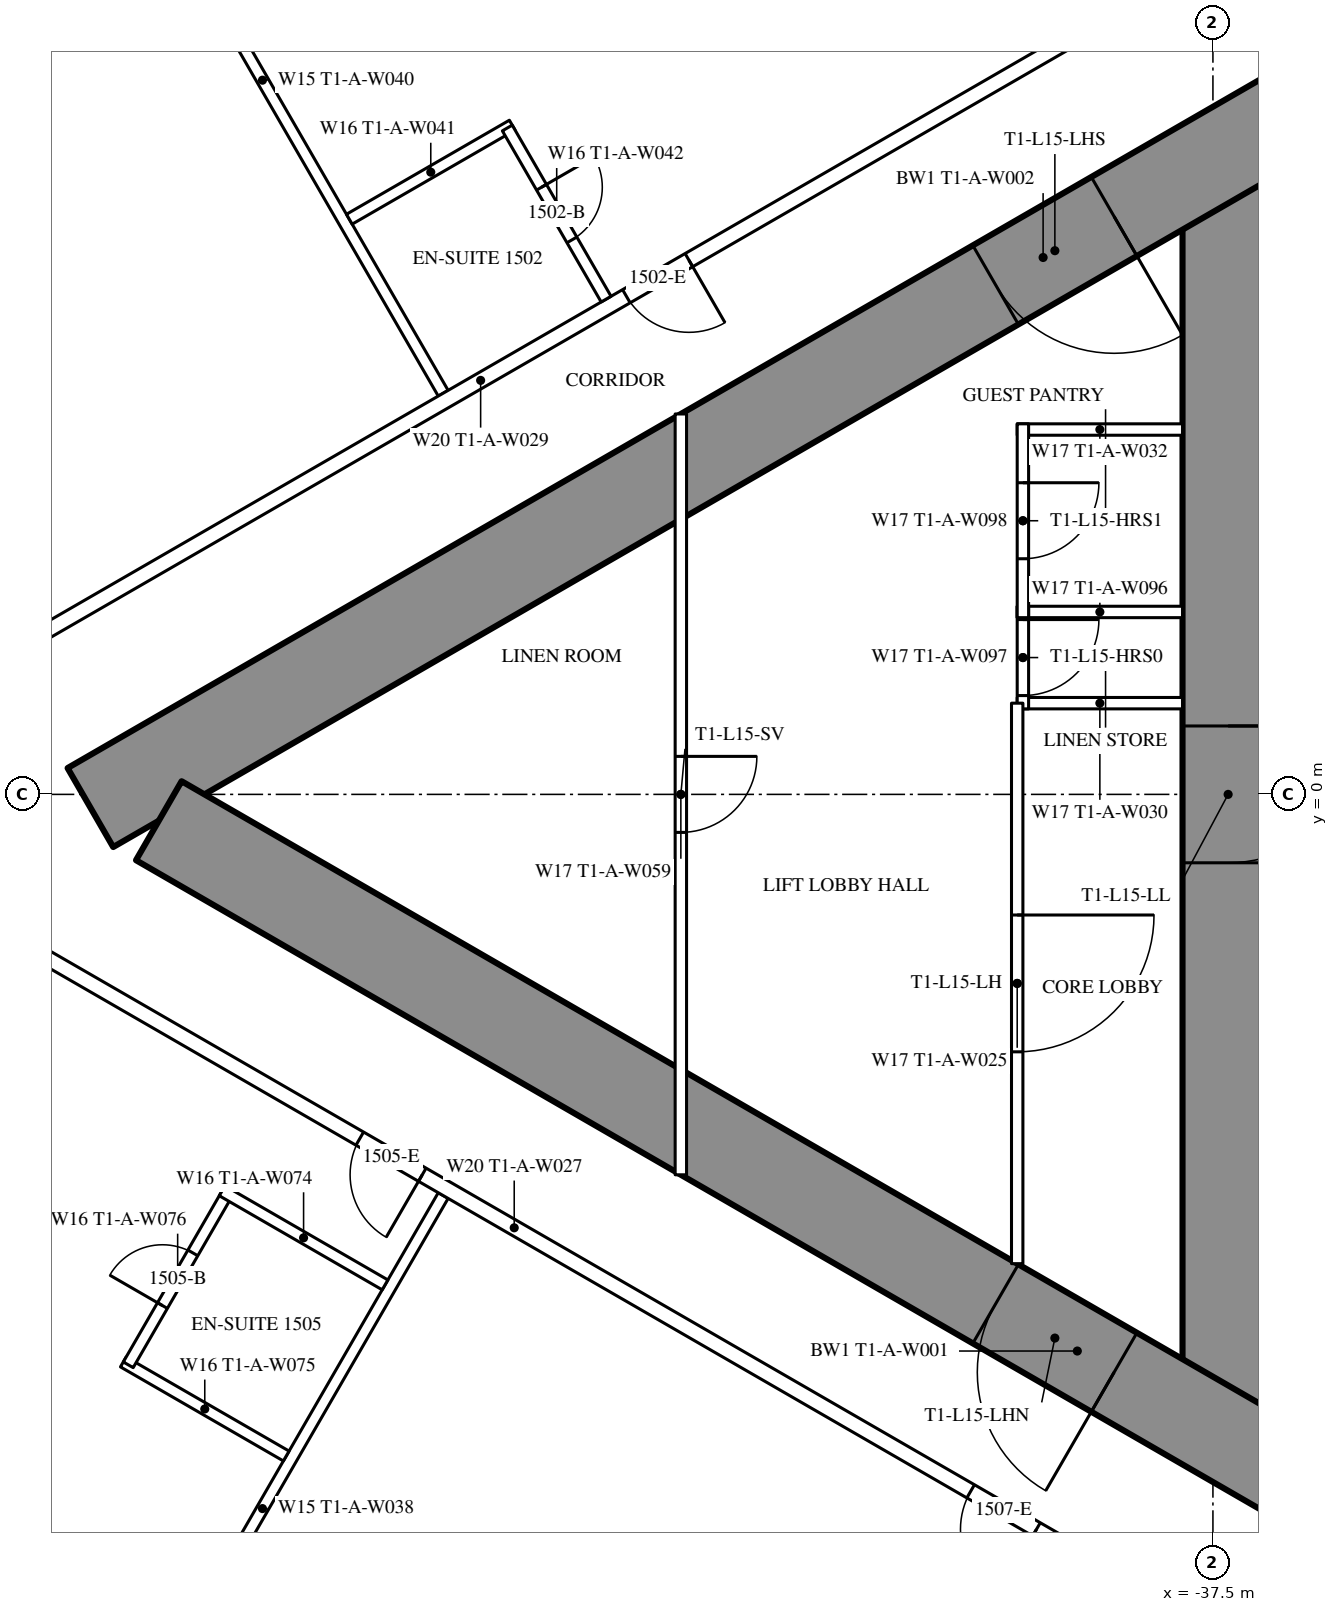
"""IFC4 building model, lengths in metres.
Left out: names, types, materials, properties, quantities, classifications, styles, units other than length and angle.
Written with IfcOpenShell. Run it as: python <this file> out.ifc"""

import sys

from ifc_helpers import new_model, si_unit, direction, frame, frame_2d, origin, place, context, subcontext, project, spatial, rectangle, extrude, element, fill, save


model = new_model("IFC4")
c1 = context("Model", 3, precision=1e-05, world=origin(), true_north=direction((0.0, 1.0)))
c2 = subcontext(c1, "Body", "Model", "MODEL_VIEW")
j1 = project(units=[si_unit("LENGTHUNIT", "METRE"), si_unit("PLANEANGLEUNIT", "RADIAN")], contexts=[c1])
p1 = place(None, origin())
s1 = spatial("IfcSite", under=j1, at=p1, CompositionType="ELEMENT")
p2 = place(p1, origin())
s2 = spatial("IfcBuilding", under=s1, at=p2, CompositionType="ELEMENT")
p3 = place(p2, frame((0.0, 0.0, 60.0)))
s3 = spatial("IfcBuildingStorey", under=s2, at=p3, CompositionType="ELEMENT", Elevation=60.0)
p4 = place(p3, frame((-37.3, 8.6, 0.0), z_axis=(0.0, 0.0, 1.0), x_axis=(0.0, -1.0, 0.0)))
e1 = element("IfcWall", 1, at=p4, inside=s3, PredefinedType="SHEAR", context=c2, shape_type="SweptSolid", body=[
    extrude(rectangle(XDim=17.2, YDim=1.2, at=frame_2d((8.6, 0.0))), origin(), (0.0, 0.0, 1.0), 3.5),
])
p5 = place(p4, frame((7.7, 0.0, 0.0)))
e2 = element("IfcOpeningElement", 2, at=p5, cuts=e1, PredefinedType="OPENING", context=c2, shape_type="SweptSolid", body=[
    extrude(rectangle(XDim=1.8, YDim=2.2, at=frame_2d((0.9, 1.1))), frame((0.0, 0.61, 0.0), z_axis=(0.0, -1.0, 0.0), x_axis=(1.0, 0.0, 0.0)), (0.0, 0.0, 1.0), 1.22),
])
p6 = place(p3, frame((-27.2, 14.3, 0.0), z_axis=(0.0, 0.0, 1.0), x_axis=(-0.866026593062, -0.499997940104, 0.0)))
e3 = element("IfcWall", 3, at=p6, inside=s3, PredefinedType="SHEAR", context=c2, shape_type="SweptSolid", body=[
    extrude(rectangle(XDim=28.946, YDim=1.2, at=frame_2d((14.473, 0.0))), origin(), (0.0, 0.0, 1.0), 3.5),
])
p7 = place(p6, frame((4.6, 0.0, 0.0)))
e4 = element("IfcOpeningElement", 4, at=p7, cuts=e3, PredefinedType="OPENING", context=c2, shape_type="SweptSolid", body=[
    extrude(rectangle(XDim=1.0, YDim=2.2, at=frame_2d((0.5, 1.1))), frame((0.0, 0.61, 0.0), z_axis=(0.0, -1.0, 0.0), x_axis=(1.0, 0.0, 0.0)), (0.0, 0.0, 1.0), 1.22),
])
p8 = place(p6, frame((13.395, 0.0, 0.0)))
e5 = element("IfcOpeningElement", 5, at=p8, cuts=e3, PredefinedType="OPENING", context=c2, shape_type="SweptSolid", body=[
    extrude(rectangle(XDim=1.8, YDim=2.2, at=frame_2d((0.9, 1.1))), frame((0.0, 0.61, 0.0), z_axis=(0.0, -1.0, 0.0), x_axis=(1.0, 0.0, 0.0)), (0.0, 0.0, 1.0), 1.22),
])
p9 = place(p3, frame((-27.2, -14.3, 0.0), z_axis=(0.0, 0.0, 1.0), x_axis=(-0.866024021859, 0.500002393557, 0.0)))
e6 = element("IfcWall", 6, at=p9, inside=s3, PredefinedType="SHEAR", context=c2, shape_type="SweptSolid", body=[
    extrude(rectangle(XDim=27.907, YDim=1.2, at=frame_2d((13.954, 0.0))), origin(), (0.0, 0.0, 1.0), 3.5),
])
p10 = place(p9, frame((4.6, 0.0, 0.0)))
e7 = element("IfcOpeningElement", 7, at=p10, cuts=e6, PredefinedType="OPENING", context=c2, shape_type="SweptSolid", body=[
    extrude(rectangle(XDim=1.0, YDim=2.2, at=frame_2d((0.5, 1.1))), frame((0.0, 0.61, 0.0), z_axis=(0.0, -1.0, 0.0), x_axis=(1.0, 0.0, 0.0)), (0.0, 0.0, 1.0), 1.22),
])
p11 = place(p9, frame((13.395, 0.0, 0.0)))
e8 = element("IfcOpeningElement", 8, at=p11, cuts=e6, PredefinedType="OPENING", context=c2, shape_type="SweptSolid", body=[
    extrude(rectangle(XDim=1.8, YDim=2.2, at=frame_2d((0.9, 1.1))), frame((0.0, 0.61, 0.0), z_axis=(0.0, -1.0, 0.0), x_axis=(1.0, 0.0, 0.0)), (0.0, 0.0, 1.0), 1.22),
])
for number, where, z_axis, x_axis in (
    (9, (-47.627, 5.278, 0.0), (0.0, 0.0, 1.0), (-0.5, 0.866, 0.0)),
    (10, (-47.627, -5.278, 0.0), (0.0, 0.0, 1.0), (-0.5, -0.866, 0.0)),
):
    element("IfcWall", number, at=place(p3, frame(where, z_axis=z_axis, x_axis=x_axis)), inside=s3, PredefinedType="PARTITIONING", context=c2, shape_type="SweptSolid", body=[
        extrude(rectangle(XDim=9.51, YDim=0.15, at=frame_2d((4.755, 0.0))), origin(), (0.0, 0.0, 1.0), 2.25),
    ])
p12 = place(p3, frame((-37.7, 10.894, 0.0), z_axis=(0.0, 0.0, 1.0), x_axis=(-0.866027905338, -0.499995667157, 0.0)))
e11 = element("IfcWall", 11, at=p12, inside=s3, PredefinedType="PARTITIONING", context=c2, shape_type="SweptSolid", body=[
    extrude(rectangle(XDim=21.787, YDim=0.2, at=frame_2d((10.894, 0.0))), origin(), (0.0, 0.0, 1.0), 3.25),
])
p13 = place(p12, frame((20.237, 0.0, 0.0)))
e12 = element("IfcOpeningElement", 12, at=p13, cuts=e11, PredefinedType="OPENING", context=c2, shape_type="SweptSolid", body=[
    extrude(rectangle(XDim=0.95, YDim=2.2, at=frame_2d((0.475, 1.1))), frame((0.0, 0.11, 0.0), z_axis=(0.0, -1.0, 0.0), x_axis=(1.0, 0.0, 0.0)), (0.0, 0.0, 1.0), 0.22),
])
p14 = place(p12, frame((7.73, 0.0, 0.0)))
e13 = element("IfcOpeningElement", 13, at=p14, cuts=e11, PredefinedType="OPENING", context=c2, shape_type="SweptSolid", body=[
    extrude(rectangle(XDim=0.95, YDim=2.2, at=frame_2d((0.475, 1.1))), frame((0.0, 0.11, 0.0), z_axis=(0.0, -1.0, 0.0), x_axis=(1.0, 0.0, 0.0)), (0.0, 0.0, 1.0), 0.22),
])
p15 = place(p3, frame((-36.92, -11.344, 0.0), z_axis=(0.0, 0.0, 1.0), x_axis=(-0.866028313256, 0.499994960614, 0.0)))
e14 = element("IfcWall", 14, at=p15, inside=s3, PredefinedType="PARTITIONING", context=c2, shape_type="SweptSolid", body=[
    extrude(rectangle(XDim=22.568, YDim=0.2, at=frame_2d((11.284, 0.0))), origin(), (0.0, 0.0, 1.0), 3.25),
])
p16 = place(p15, frame((12.68, 0.0, 0.0)))
e15 = element("IfcOpeningElement", 15, at=p16, cuts=e14, PredefinedType="OPENING", context=c2, shape_type="SweptSolid", body=[
    extrude(rectangle(XDim=0.95, YDim=2.2, at=frame_2d((0.475, 1.1))), frame((0.0, 0.11, 0.0), z_axis=(0.0, -1.0, 0.0), x_axis=(1.0, 0.0, 0.0)), (0.0, 0.0, 1.0), 0.22),
])
p17 = place(p15, frame((3.35, 0.0, 0.0)))
e16 = element("IfcOpeningElement", 16, at=p17, cuts=e14, PredefinedType="OPENING", context=c2, shape_type="SweptSolid", body=[
    extrude(rectangle(XDim=1.0, YDim=2.2, at=frame_2d((0.5, 1.1))), frame((0.0, 0.11, 0.0), z_axis=(0.0, -1.0, 0.0), x_axis=(1.0, 0.0, 0.0)), (0.0, 0.0, 1.0), 0.22),
])
p18 = place(p3, frame((-49.692, -8.704, 0.0), z_axis=(0.0, 0.0, 1.0), x_axis=(-0.866073894602, 0.499916002032, 0.0)))
e17 = element("IfcWall", 17, at=p18, inside=s3, PredefinedType="PARTITIONING", context=c2, shape_type="SweptSolid", body=[
    extrude(rectangle(XDim=2.475, YDim=0.15, at=frame_2d((1.238, 0.0))), origin(), (0.0, 0.0, 1.0), 3.25),
])
p19 = place(p3, frame((-50.47, -5.253, 0.0), z_axis=(0.0, 0.0, 1.0), x_axis=(-0.500006934395, -0.866021400173, 0.0)))
e18 = element("IfcWall", 18, at=p19, inside=s3, PredefinedType="PARTITIONING", context=c2, shape_type="SweptSolid", body=[
    extrude(rectangle(XDim=2.6, YDim=0.15, at=frame_2d((1.3, 0.0))), origin(), (0.0, 0.0, 1.0), 3.25),
])
p20 = place(p19, frame((0.9, 0.0, 0.0)))
e19 = element("IfcOpeningElement", 19, at=p20, cuts=e18, PredefinedType="OPENING", context=c2, shape_type="SweptSolid", body=[
    extrude(rectangle(XDim=0.8, YDim=2.2, at=frame_2d((0.4, 1.1))), frame((0.0, 0.085, 0.0), z_axis=(0.0, -1.0, 0.0), x_axis=(1.0, 0.0, 0.0)), (0.0, 0.0, 1.0), 0.17),
])
for number, where, z_axis, x_axis in (
    (20, (-48.392, -6.453, 0.0), (0.0, 0.0, 1.0), (-0.866, 0.5, 0.0)),
    (21, (-46.719, 8.804, 0.0), (0.0, 0.0, 1.0), (-0.866, -0.5, 0.0)),
):
    element("IfcWall", number, at=place(p3, frame(where, z_axis=z_axis, x_axis=x_axis)), inside=s3, PredefinedType="PARTITIONING", context=c2, shape_type="SweptSolid", body=[
        extrude(rectangle(XDim=2.475, YDim=0.15, at=frame_2d((1.237, 0.0))), origin(), (0.0, 0.0, 1.0), 3.25),
    ])
p21 = place(p3, frame((-45.483, 6.515, 0.0), z_axis=(0.0, 0.0, 1.0), x_axis=(-0.500006934395, 0.866021400173, 0.0)))
e22 = element("IfcWall", 22, at=p21, inside=s3, PredefinedType="PARTITIONING", context=c2, shape_type="SweptSolid", body=[
    extrude(rectangle(XDim=2.6, YDim=0.15, at=frame_2d((1.3, 0.0))), origin(), (0.0, 0.0, 1.0), 3.25),
])
p22 = place(p21, frame((0.9, 0.0, 0.0)))
e23 = element("IfcOpeningElement", 23, at=p22, cuts=e22, PredefinedType="OPENING", context=c2, shape_type="SweptSolid", body=[
    extrude(rectangle(XDim=0.8, YDim=2.2, at=frame_2d((0.4, 1.1))), frame((0.0, 0.085, 0.0), z_axis=(0.0, -1.0, 0.0), x_axis=(1.0, 0.0, 0.0)), (0.0, 0.0, 1.0), 0.17),
])
for number, where, z_axis, x_axis in (
    (24, (-37.9, 1.2, 0.0), (0.0, 0.0, 1.0), (-1.0, 0.0, 0.0)),
    (25, (-37.9, 2.4, 0.0), (0.0, 0.0, 1.0), (-1.0, 0.0, 0.0)),
    (26, (-37.9, 4.8, 0.0), (0.0, 0.0, 1.0), (-1.0, 0.0, 0.0)),
):
    element("IfcWall", number, at=place(p3, frame(where, z_axis=z_axis, x_axis=x_axis)), inside=s3, PredefinedType="PARTITIONING", context=c2, shape_type="SweptSolid", body=[
        extrude(rectangle(XDim=2.175, YDim=0.15, at=frame_2d((1.087, 0.0))), origin(), (0.0, 0.0, 1.0), 3.25),
    ])
p23 = place(p3, frame((-40.0, 2.475, 0.0), z_axis=(0.0, 0.0, 1.0), x_axis=(0.0, -1.0, 0.0)))
e27 = element("IfcWall", 27, at=p23, inside=s3, PredefinedType="PARTITIONING", context=c2, shape_type="SweptSolid", body=[
    extrude(rectangle(XDim=1.35, YDim=0.15, at=frame_2d((0.675, 0.0))), origin(), (0.0, 0.0, 1.0), 3.25),
])
p24 = place(p23, frame((0.175, 0.0, 0.0)))
e28 = element("IfcOpeningElement", 28, at=p24, cuts=e27, PredefinedType="OPENING", context=c2, shape_type="SweptSolid", body=[
    extrude(rectangle(XDim=1.0, YDim=2.2, at=frame_2d((0.5, 1.1))), frame((0.0, 0.085, 0.0), z_axis=(0.0, -1.0, 0.0), x_axis=(1.0, 0.0, 0.0)), (0.0, 0.0, 1.0), 0.17),
])
p25 = place(p3, frame((-40.0, 4.875, 0.0), z_axis=(0.0, 0.0, 1.0), x_axis=(0.0, -1.0, 0.0)))
e29 = element("IfcWall", 29, at=p25, inside=s3, PredefinedType="PARTITIONING", context=c2, shape_type="SweptSolid", body=[
    extrude(rectangle(XDim=2.55, YDim=0.15, at=frame_2d((1.275, 0.0))), origin(), (0.0, 0.0, 1.0), 3.25),
])
p26 = place(p25, frame((0.775, 0.0, 0.0)))
e30 = element("IfcOpeningElement", 30, at=p26, cuts=e29, PredefinedType="OPENING", context=c2, shape_type="SweptSolid", body=[
    extrude(rectangle(XDim=1.0, YDim=2.2, at=frame_2d((0.5, 1.1))), frame((0.0, 0.085, 0.0), z_axis=(0.0, -1.0, 0.0), x_axis=(1.0, 0.0, 0.0)), (0.0, 0.0, 1.0), 0.17),
])
p27 = place(p3, frame((-40.075, 1.2, 0.0), z_axis=(0.0, 0.0, 1.0), x_axis=(0.0, -1.0, 0.0)))
e31 = element("IfcWall", 31, at=p27, inside=s3, PredefinedType="PARTITIONING", context=c2, shape_type="SweptSolid", body=[
    extrude(rectangle(XDim=7.374, YDim=0.15, at=frame_2d((3.687, 0.0))), origin(), (0.0, 0.0, 1.0), 3.25),
])
p28 = place(p27, frame((2.787, 0.0, 0.0)))
e32 = element("IfcOpeningElement", 32, at=p28, cuts=e31, PredefinedType="OPENING", context=c2, shape_type="SweptSolid", body=[
    extrude(rectangle(XDim=1.8, YDim=2.2, at=frame_2d((0.9, 1.1))), frame((0.0, 0.085, 0.0), z_axis=(0.0, -1.0, 0.0), x_axis=(1.0, 0.0, 0.0)), (0.0, 0.0, 1.0), 0.17),
])
p29 = place(p3, frame((-44.5, 5.005, 0.0), z_axis=(0.0, 0.0, 1.0), x_axis=(0.0, -1.0, 0.0)))
e33 = element("IfcWall", 33, at=p29, inside=s3, PredefinedType="PARTITIONING", context=c2, shape_type="SweptSolid", body=[
    extrude(rectangle(XDim=10.009, YDim=0.15, at=frame_2d((5.005, 0.0))), origin(), (0.0, 0.0, 1.0), 2.45),
])
p30 = place(p29, frame((4.505, 0.0, 0.0)))
e34 = element("IfcOpeningElement", 34, at=p30, cuts=e33, PredefinedType="OPENING", context=c2, shape_type="SweptSolid", body=[
    extrude(rectangle(XDim=1.0, YDim=2.2, at=frame_2d((0.5, 1.1))), frame((0.0, 0.085, 0.0), z_axis=(0.0, -1.0, 0.0), x_axis=(1.0, 0.0, 0.0)), (0.0, 0.0, 1.0), 0.17),
])
p31 = place(p20, origin())
e35 = element("IfcDoor", 35, at=p31, inside=s3, OperationType="SINGLE_SWING_RIGHT", PredefinedType="DOOR", context=c2, shape_type="SweptSolid", body=[
    extrude(rectangle(XDim=0.8, YDim=2.2, at=frame_2d((0.4, 1.1))), frame((0.0, 0.025, 0.0), z_axis=(0.0, -1.0, 0.0), x_axis=(1.0, 0.0, 0.0)), (0.0, 0.0, 1.0), 0.05),
])
fill(e19, e35)
p32 = place(p16, origin())
e36 = element("IfcDoor", 36, at=p32, inside=s3, OperationType="SINGLE_SWING_LEFT", PredefinedType="DOOR", context=c2, shape_type="SweptSolid", body=[
    extrude(rectangle(XDim=0.95, YDim=2.2, at=frame_2d((0.475, 1.1))), frame((0.0, 0.025, 0.0), z_axis=(0.0, -1.0, 0.0), x_axis=(1.0, 0.0, 0.0)), (0.0, 0.0, 1.0), 0.05),
])
fill(e15, e36)
p33 = place(p17, origin())
e37 = element("IfcDoor", 37, at=p33, inside=s3, OperationType="SINGLE_SWING_LEFT", PredefinedType="DOOR", context=c2, shape_type="SweptSolid", body=[
    extrude(rectangle(XDim=1.0, YDim=2.2, at=frame_2d((0.5, 1.1))), frame((0.0, 0.025, 0.0), z_axis=(0.0, -1.0, 0.0), x_axis=(1.0, 0.0, 0.0)), (0.0, 0.0, 1.0), 0.05),
])
fill(e16, e37)
p34 = place(p22, origin())
e38 = element("IfcDoor", 38, at=p34, inside=s3, OperationType="SINGLE_SWING_RIGHT", PredefinedType="DOOR", context=c2, shape_type="SweptSolid", body=[
    extrude(rectangle(XDim=0.8, YDim=2.2, at=frame_2d((0.4, 1.1))), frame((0.0, 0.025, 0.0), z_axis=(0.0, -1.0, 0.0), x_axis=(1.0, 0.0, 0.0)), (0.0, 0.0, 1.0), 0.05),
])
fill(e23, e38)
p35 = place(p14, origin())
e39 = element("IfcDoor", 39, at=p35, inside=s3, OperationType="SINGLE_SWING_LEFT", PredefinedType="DOOR", context=c2, shape_type="SweptSolid", body=[
    extrude(rectangle(XDim=0.95, YDim=2.2, at=frame_2d((0.475, 1.1))), frame((0.0, 0.025, 0.0), z_axis=(0.0, -1.0, 0.0), x_axis=(1.0, 0.0, 0.0)), (0.0, 0.0, 1.0), 0.05),
])
fill(e13, e39)
p36 = place(p24, origin())
e40 = element("IfcDoor", 40, at=p36, inside=s3, OperationType="SINGLE_SWING_LEFT", PredefinedType="DOOR", context=c2, shape_type="SweptSolid", body=[
    extrude(rectangle(XDim=1.0, YDim=2.2, at=frame_2d((0.5, 1.1))), frame((0.0, 0.025, 0.0), z_axis=(0.0, -1.0, 0.0), x_axis=(1.0, 0.0, 0.0)), (0.0, 0.0, 1.0), 0.05),
])
fill(e28, e40)
p37 = place(p26, origin())
e41 = element("IfcDoor", 41, at=p37, inside=s3, OperationType="SINGLE_SWING_LEFT", PredefinedType="DOOR", context=c2, shape_type="SweptSolid", body=[
    extrude(rectangle(XDim=1.0, YDim=2.2, at=frame_2d((0.5, 1.1))), frame((0.0, 0.025, 0.0), z_axis=(0.0, -1.0, 0.0), x_axis=(1.0, 0.0, 0.0)), (0.0, 0.0, 1.0), 0.05),
])
fill(e30, e41)
p38 = place(p28, origin())
e42 = element("IfcDoor", 42, at=p38, inside=s3, OperationType="DOUBLE_DOOR_SINGLE_SWING", PredefinedType="DOOR", context=c2, shape_type="SweptSolid", body=[
    extrude(rectangle(XDim=1.8, YDim=2.2, at=frame_2d((0.9, 1.1))), frame((0.0, 0.025, 0.0), z_axis=(0.0, -1.0, 0.0), x_axis=(1.0, 0.0, 0.0)), (0.0, 0.0, 1.0), 0.05),
])
fill(e32, e42)
p39 = place(p30, origin())
e43 = element("IfcDoor", 43, at=p39, inside=s3, OperationType="SINGLE_SWING_LEFT", PredefinedType="DOOR", context=c2, shape_type="SweptSolid", body=[
    extrude(rectangle(XDim=1.0, YDim=2.2, at=frame_2d((0.5, 1.1))), frame((0.0, 0.025, 0.0), z_axis=(0.0, -1.0, 0.0), x_axis=(1.0, 0.0, 0.0)), (0.0, 0.0, 1.0), 0.05),
])
fill(e34, e43)
p40 = place(p8, origin())
e44 = element("IfcDoor", 44, at=p40, inside=s3, OperationType="DOUBLE_DOOR_SINGLE_SWING", PredefinedType="DOOR", context=c2, shape_type="SweptSolid", body=[
    extrude(rectangle(XDim=1.8, YDim=2.2, at=frame_2d((0.9, 1.1))), frame((0.0, 0.025, 0.0), z_axis=(0.0, -1.0, 0.0), x_axis=(1.0, 0.0, 0.0)), (0.0, 0.0, 1.0), 0.05),
])
fill(e5, e44)
p41 = place(p11, origin())
e45 = element("IfcDoor", 45, at=p41, inside=s3, OperationType="DOUBLE_DOOR_SINGLE_SWING", PredefinedType="DOOR", context=c2, shape_type="SweptSolid", body=[
    extrude(rectangle(XDim=1.8, YDim=2.2, at=frame_2d((0.9, 1.1))), frame((0.0, 0.025, 0.0), z_axis=(0.0, -1.0, 0.0), x_axis=(1.0, 0.0, 0.0)), (0.0, 0.0, 1.0), 0.05),
])
fill(e8, e45)
p42 = place(p5, origin())
e46 = element("IfcDoor", 46, at=p42, inside=s3, OperationType="DOUBLE_DOOR_SINGLE_SWING", PredefinedType="DOOR", context=c2, shape_type="SweptSolid", body=[
    extrude(rectangle(XDim=1.8, YDim=2.2, at=frame_2d((0.9, 1.1))), frame((0.0, 0.025, 0.0), z_axis=(0.0, -1.0, 0.0), x_axis=(1.0, 0.0, 0.0)), (0.0, 0.0, 1.0), 0.05),
])
fill(e2, e46)
save(model, sys.argv[1])
